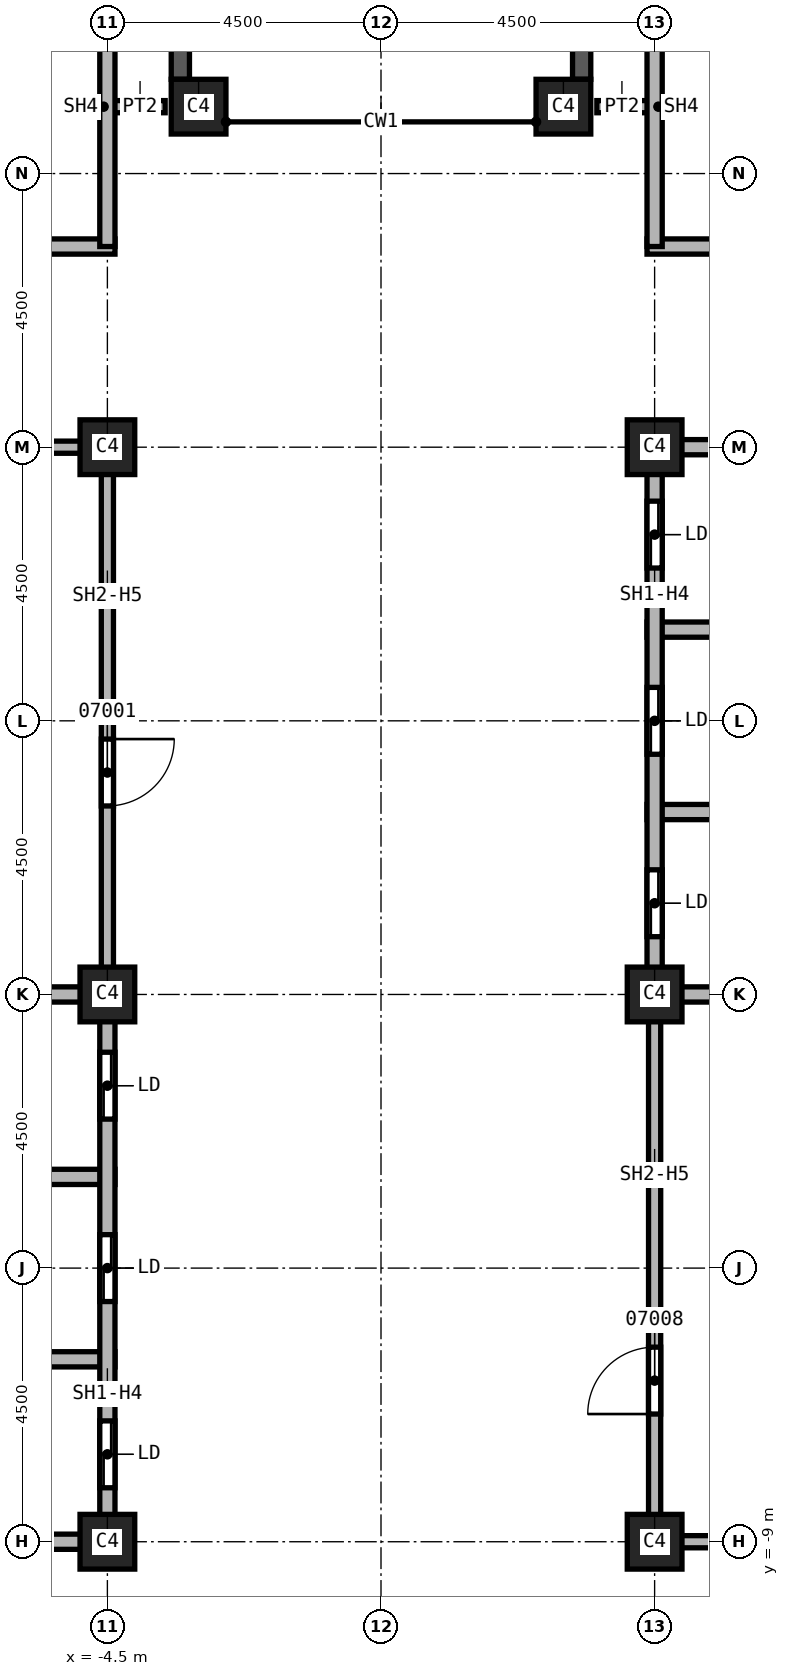
"""IFC4 building model, lengths in metres.
Left out: names, types, materials, properties, quantities, classifications, styles, units other than length and angle.
Written with IfcOpenShell. Run it as: python <this file> out.ifc"""

import sys

from ifc_helpers import new_model, si_unit, direction, frame, frame_2d, origin, origin_2d, place, context, subcontext, project, spatial, rectangle, extrude, element, fill, save


model = new_model("IFC4")
c1 = context("Model", 3, precision=1e-05, world=origin(), true_north=direction((0.0, 1.0)))
c2 = subcontext(c1, "Body", "Model", "MODEL_VIEW")
j1 = project(units=[si_unit("LENGTHUNIT", "METRE"), si_unit("PLANEANGLEUNIT", "RADIAN")], contexts=[c1])
p1 = place(None, origin())
s1 = spatial("IfcSite", under=j1, at=p1, CompositionType="ELEMENT")
p2 = place(p1, origin())
s2 = spatial("IfcBuilding", under=s1, at=p2, CompositionType="ELEMENT")
p3 = place(p2, frame((0.0, 0.0, 138.0)))
s3 = spatial("IfcBuildingStorey", under=s2, at=p3, CompositionType="ELEMENT", Elevation=138.0)
for number, where, z_axis, x_axis in (
    (1, (4.5, 0.0, 0.0), (0.0, 0.0, 1.0), (1.0, 0.0, 0.0)),
    (2, (4.5, 9.0, 0.0), (0.0, 0.0, 1.0), (1.0, 0.0, 0.0)),
    (3, (4.5, -9.0, 0.0), (0.0, 0.0, 1.0), (1.0, 0.0, 0.0)),
    (4, (-4.5, 0.0, 0.0), (0.0, 0.0, 1.0), (1.0, 0.0, 0.0)),
    (5, (-4.5, 9.0, 0.0), (0.0, 0.0, 1.0), (1.0, 0.0, 0.0)),
    (6, (-4.5, -9.0, 0.0), (0.0, 0.0, 1.0), (1.0, 0.0, 0.0)),
    (7, (3.0, 14.6, 0.0), (0.0, 0.0, 1.0), (1.0, 0.0, 0.0)),
    (8, (-3.0, 14.6, 0.0), (0.0, 0.0, 1.0), (1.0, 0.0, 0.0)),
):
    element("IfcColumn", number, at=place(p3, frame(where, z_axis=z_axis, x_axis=x_axis)), inside=s3, PredefinedType="COLUMN", context=c2, shape_type="SweptSolid", body=[
        extrude(rectangle(XDim=0.9, YDim=0.9, at=origin_2d()), origin(), (0.0, 0.0, 1.0), 3.7),
    ])
p4 = place(p3, frame((3.3, 23.05, 0.0), z_axis=(0.0, 0.0, 1.0), x_axis=(0.0, -1.0, 0.0)))
e9 = element("IfcWall", 9, at=p4, inside=s3, PredefinedType="SOLIDWALL", context=c2, shape_type="SweptSolid", body=[
    extrude(rectangle(XDim=8.0, YDim=0.3, at=frame_2d((4.0, 0.0))), origin(), (0.0, 0.0, 1.0), 3.1),
])
p5 = place(p4, frame((0.8, 0.0, 0.8)))
e10 = element("IfcOpeningElement", 10, at=p5, cuts=e9, PredefinedType="OPENING", context=c2, shape_type="SweptSolid", body=[
    extrude(rectangle(XDim=2.4, YDim=1.95, at=frame_2d((1.2, 0.975))), frame((0.0, 0.15, 0.0), z_axis=(0.0, -1.0, 0.0), x_axis=(1.0, 0.0, 0.0)), (0.0, 0.0, 1.0), 0.3),
])
p6 = place(p4, frame((4.8, 0.0, 0.8)))
e11 = element("IfcOpeningElement", 11, at=p6, cuts=e9, PredefinedType="OPENING", context=c2, shape_type="SweptSolid", body=[
    extrude(rectangle(XDim=2.4, YDim=1.95, at=frame_2d((1.2, 0.975))), frame((0.0, 0.15, 0.0), z_axis=(0.0, -1.0, 0.0), x_axis=(1.0, 0.0, 0.0)), (0.0, 0.0, 1.0), 0.3),
])
p7 = place(p3, frame((-3.3, 15.05, 0.0), z_axis=(0.0, 0.0, 1.0), x_axis=(0.0, 1.0, 0.0)))
e12 = element("IfcWall", 12, at=p7, inside=s3, PredefinedType="SOLIDWALL", context=c2, shape_type="SweptSolid", body=[
    extrude(rectangle(XDim=8.0, YDim=0.3, at=frame_2d((4.0, 0.0))), origin(), (0.0, 0.0, 1.0), 3.1),
])
p8 = place(p7, frame((0.8, 0.0, 0.8)))
e13 = element("IfcOpeningElement", 13, at=p8, cuts=e12, PredefinedType="OPENING", context=c2, shape_type="SweptSolid", body=[
    extrude(rectangle(XDim=2.4, YDim=1.95, at=frame_2d((1.2, 0.975))), frame((0.0, 0.15, 0.0), z_axis=(0.0, -1.0, 0.0), x_axis=(1.0, 0.0, 0.0)), (0.0, 0.0, 1.0), 0.3),
])
p9 = place(p7, frame((4.8, 0.0, 0.8)))
e14 = element("IfcOpeningElement", 14, at=p9, cuts=e12, PredefinedType="OPENING", context=c2, shape_type="SweptSolid", body=[
    extrude(rectangle(XDim=2.4, YDim=1.95, at=frame_2d((1.2, 0.975))), frame((0.0, 0.15, 0.0), z_axis=(0.0, -1.0, 0.0), x_axis=(1.0, 0.0, 0.0)), (0.0, 0.0, 1.0), 0.3),
])
for number, where, z_axis, x_axis in (
    (15, (-4.5, 14.6, 0.0), (0.0, 0.0, 1.0), (1.0, 0.0, 0.0)),
    (16, (3.55, 14.6, 0.0), (0.0, 0.0, 1.0), (1.0, 0.0, 0.0)),
):
    element("IfcWall", number, at=place(p3, frame(where, z_axis=z_axis, x_axis=x_axis)), inside=s3, PredefinedType="PARTITIONING", context=c2, shape_type="SweptSolid", body=[
        extrude(rectangle(XDim=0.95, YDim=0.2, at=frame_2d((0.475, 0.0))), origin(), (0.0, 0.0, 1.0), 3.7),
    ])
p10 = place(p3, frame((-7.5, 9.0, 0.0), z_axis=(0.0, 0.0, 1.0), x_axis=(1.0, 0.0, 0.0)))
e17 = element("IfcWall", 17, at=p10, inside=s3, PredefinedType="SOLIDWALL", context=c2, shape_type="SweptSolid", body=[
    extrude(rectangle(XDim=3.0, YDim=0.2, at=frame_2d((1.5, 0.0))), origin(), (0.0, 0.0, 1.0), 2.938),
])
p11 = place(p3, frame((-4.5, 9.1, 0.0), z_axis=(0.0, 0.0, 1.0), x_axis=(0.0, -1.0, 0.0)))
e18 = element("IfcWall", 18, at=p11, inside=s3, PredefinedType="SOLIDWALL", context=c2, shape_type="SweptSolid", body=[
    extrude(rectangle(XDim=9.1, YDim=0.2, at=frame_2d((4.55, 0.0))), origin(), (0.0, 0.0, 1.0), 2.938),
])
p12 = place(p11, frame((4.9, 0.0, 0.0)))
e19 = element("IfcOpeningElement", 19, at=p12, cuts=e18, PredefinedType="OPENING", context=c2, shape_type="SweptSolid", body=[
    extrude(rectangle(XDim=1.1, YDim=2.1, at=frame_2d((0.55, 1.05))), frame((0.0, 0.1, 0.0), z_axis=(0.0, -1.0, 0.0), x_axis=(1.0, 0.0, 0.0)), (0.0, 0.0, 1.0), 0.2),
])
p13 = place(p3, frame((4.5, -9.1, 0.0), z_axis=(0.0, 0.0, 1.0), x_axis=(0.0, 1.0, 0.0)))
e20 = element("IfcWall", 20, at=p13, inside=s3, PredefinedType="SOLIDWALL", context=c2, shape_type="SweptSolid", body=[
    extrude(rectangle(XDim=9.1, YDim=0.2, at=frame_2d((4.55, 0.0))), origin(), (0.0, 0.0, 1.0), 2.938),
])
p14 = place(p13, frame((2.2, 0.0, 0.0)))
e21 = element("IfcOpeningElement", 21, at=p14, cuts=e20, PredefinedType="OPENING", context=c2, shape_type="SweptSolid", body=[
    extrude(rectangle(XDim=1.1, YDim=2.1, at=frame_2d((0.55, 1.05))), frame((0.0, 0.1, 0.0), z_axis=(0.0, -1.0, 0.0), x_axis=(1.0, 0.0, 0.0)), (0.0, 0.0, 1.0), 0.2),
])
p15 = place(p3, frame((7.5, -9.0, 0.0), z_axis=(0.0, 0.0, 1.0), x_axis=(-1.0, 0.0, 0.0)))
e22 = element("IfcWall", 22, at=p15, inside=s3, PredefinedType="SOLIDWALL", context=c2, shape_type="SweptSolid", body=[
    extrude(rectangle(XDim=3.0, YDim=0.2, at=frame_2d((1.5, 0.0))), origin(), (0.0, 0.0, 1.0), 2.938),
])
p16 = place(p3, frame((-13.625, -3.0, 0.0), z_axis=(0.0, 0.0, 1.0), x_axis=(1.0, 0.0, 0.0)))
e23 = element("IfcWall", 23, at=p16, inside=s3, PredefinedType="SOLIDWALL", context=c2, shape_type="SweptSolid", body=[
    extrude(rectangle(XDim=9.25, YDim=0.25, at=frame_2d((4.625, 0.0))), origin(), (0.0, 0.0, 1.0), 3.7),
])
p17 = place(p16, frame((3.25, 0.0, 0.0)))
e24 = element("IfcOpeningElement", 24, at=p17, cuts=e23, PredefinedType="OPENING", context=c2, shape_type="SweptSolid", body=[
    extrude(rectangle(XDim=1.1, YDim=2.1, at=frame_2d((0.55, 1.05))), frame((0.0, 0.125, 0.0), z_axis=(0.0, -1.0, 0.0), x_axis=(1.0, 0.0, 0.0)), (0.0, 0.0, 1.0), 0.25),
])
for number, where, z_axis, x_axis in (
    (25, (-7.625, -6.0, 0.0), (0.0, 0.0, 1.0), (1.0, 0.0, 0.0)),
    (26, (-7.625, 0.0, 0.0), (0.0, 0.0, 1.0), (1.0, 0.0, 0.0)),
):
    element("IfcWall", number, at=place(p3, frame(where, z_axis=z_axis, x_axis=x_axis)), inside=s3, PredefinedType="SOLIDWALL", context=c2, shape_type="SweptSolid", body=[
        extrude(rectangle(XDim=3.25, YDim=0.25, at=frame_2d((1.625, 0.0))), origin(), (0.0, 0.0, 1.0), 3.7),
    ])
p18 = place(p3, frame((-4.5, -9.0, 0.0), z_axis=(0.0, 0.0, 1.0), x_axis=(-1.0, 0.0, 0.0)))
e27 = element("IfcWall", 27, at=p18, inside=s3, PredefinedType="SOLIDWALL", context=c2, shape_type="SweptSolid", body=[
    extrude(rectangle(XDim=3.0, YDim=0.25, at=frame_2d((1.5, 0.0))), origin(), (0.0, 0.0, 1.0), 2.938),
])
p19 = place(p3, frame((-4.5, 0.0, 0.0), z_axis=(0.0, 0.0, 1.0), x_axis=(0.0, -1.0, 0.0)))
e28 = element("IfcWall", 28, at=p19, inside=s3, PredefinedType="SOLIDWALL", context=c2, shape_type="SweptSolid", body=[
    extrude(rectangle(XDim=9.125, YDim=0.25, at=frame_2d((4.562, 0.0))), origin(), (0.0, 0.0, 1.0), 2.938),
])
p20 = place(p19, frame((7.012, 0.0, 0.0)))
e29 = element("IfcOpeningElement", 29, at=p20, cuts=e28, PredefinedType="OPENING", context=c2, shape_type="SweptSolid", body=[
    extrude(rectangle(XDim=1.1, YDim=2.1, at=frame_2d((0.55, 1.05))), frame((0.0, 0.125, 0.0), z_axis=(0.0, -1.0, 0.0), x_axis=(1.0, 0.0, 0.0)), (0.0, 0.0, 1.0), 0.25),
])
p21 = place(p19, frame((3.95, 0.0, 0.0)))
e30 = element("IfcOpeningElement", 30, at=p21, cuts=e28, PredefinedType="OPENING", context=c2, shape_type="SweptSolid", body=[
    extrude(rectangle(XDim=1.1, YDim=2.1, at=frame_2d((0.55, 1.05))), frame((0.0, 0.125, 0.0), z_axis=(0.0, -1.0, 0.0), x_axis=(1.0, 0.0, 0.0)), (0.0, 0.0, 1.0), 0.25),
])
p22 = place(p19, frame((0.95, 0.0, 0.0)))
e31 = element("IfcOpeningElement", 31, at=p22, cuts=e28, PredefinedType="OPENING", context=c2, shape_type="SweptSolid", body=[
    extrude(rectangle(XDim=1.1, YDim=2.1, at=frame_2d((0.55, 1.05))), frame((0.0, 0.125, 0.0), z_axis=(0.0, -1.0, 0.0), x_axis=(1.0, 0.0, 0.0)), (0.0, 0.0, 1.0), 0.25),
])
p23 = place(p3, frame((4.375, 0.0, 0.0), z_axis=(0.0, 0.0, 1.0), x_axis=(1.0, 0.0, 0.0)))
e32 = element("IfcWall", 32, at=p23, inside=s3, PredefinedType="SOLIDWALL", context=c2, shape_type="SweptSolid", body=[
    extrude(rectangle(XDim=3.25, YDim=0.25, at=frame_2d((1.625, 0.0))), origin(), (0.0, 0.0, 1.0), 3.7),
])
p24 = place(p3, frame((4.375, 3.0, 0.0), z_axis=(0.0, 0.0, 1.0), x_axis=(1.0, 0.0, 0.0)))
e33 = element("IfcWall", 33, at=p24, inside=s3, PredefinedType="SOLIDWALL", context=c2, shape_type="SweptSolid", body=[
    extrude(rectangle(XDim=9.25, YDim=0.25, at=frame_2d((4.625, 0.0))), origin(), (0.0, 0.0, 1.0), 3.7),
])
p25 = place(p24, frame((4.125, 0.0, 0.0)))
e34 = element("IfcOpeningElement", 34, at=p25, cuts=e33, PredefinedType="OPENING", context=c2, shape_type="SweptSolid", body=[
    extrude(rectangle(XDim=1.1, YDim=2.1, at=frame_2d((0.55, 1.05))), frame((0.0, 0.125, 0.0), z_axis=(0.0, -1.0, 0.0), x_axis=(1.0, 0.0, 0.0)), (0.0, 0.0, 1.0), 0.25),
])
p26 = place(p3, frame((4.375, 6.0, 0.0), z_axis=(0.0, 0.0, 1.0), x_axis=(1.0, 0.0, 0.0)))
e35 = element("IfcWall", 35, at=p26, inside=s3, PredefinedType="SOLIDWALL", context=c2, shape_type="SweptSolid", body=[
    extrude(rectangle(XDim=3.25, YDim=0.25, at=frame_2d((1.625, 0.0))), origin(), (0.0, 0.0, 1.0), 3.7),
])
p27 = place(p3, frame((4.5, 0.0, 0.0), z_axis=(0.0, 0.0, 1.0), x_axis=(0.0, 1.0, 0.0)))
e36 = element("IfcWall", 36, at=p27, inside=s3, PredefinedType="SOLIDWALL", context=c2, shape_type="SweptSolid", body=[
    extrude(rectangle(XDim=9.125, YDim=0.25, at=frame_2d((4.562, 0.0))), origin(), (0.0, 0.0, 1.0), 2.938),
])
p28 = place(p27, frame((0.95, 0.0, 0.0)))
e37 = element("IfcOpeningElement", 37, at=p28, cuts=e36, PredefinedType="OPENING", context=c2, shape_type="SweptSolid", body=[
    extrude(rectangle(XDim=1.1, YDim=2.1, at=frame_2d((0.55, 1.05))), frame((0.0, 0.125, 0.0), z_axis=(0.0, -1.0, 0.0), x_axis=(1.0, 0.0, 0.0)), (0.0, 0.0, 1.0), 0.25),
])
p29 = place(p27, frame((3.95, 0.0, 0.0)))
e38 = element("IfcOpeningElement", 38, at=p29, cuts=e36, PredefinedType="OPENING", context=c2, shape_type="SweptSolid", body=[
    extrude(rectangle(XDim=1.1, YDim=2.1, at=frame_2d((0.55, 1.05))), frame((0.0, 0.125, 0.0), z_axis=(0.0, -1.0, 0.0), x_axis=(1.0, 0.0, 0.0)), (0.0, 0.0, 1.0), 0.25),
])
p30 = place(p27, frame((7.012, 0.0, 0.0)))
e39 = element("IfcOpeningElement", 39, at=p30, cuts=e36, PredefinedType="OPENING", context=c2, shape_type="SweptSolid", body=[
    extrude(rectangle(XDim=1.1, YDim=2.1, at=frame_2d((0.55, 1.05))), frame((0.0, 0.125, 0.0), z_axis=(0.0, -1.0, 0.0), x_axis=(1.0, 0.0, 0.0)), (0.0, 0.0, 1.0), 0.25),
])
p31 = place(p3, frame((4.5, 9.0, 0.0), z_axis=(0.0, 0.0, 1.0), x_axis=(1.0, 0.0, 0.0)))
e40 = element("IfcWall", 40, at=p31, inside=s3, PredefinedType="SOLIDWALL", context=c2, shape_type="SweptSolid", body=[
    extrude(rectangle(XDim=3.0, YDim=0.25, at=frame_2d((1.5, 0.0))), origin(), (0.0, 0.0, 1.0), 2.938),
])
p32 = place(p3, frame((-13.5, 12.3, 0.0), z_axis=(0.0, 0.0, 1.0), x_axis=(1.0, 0.0, 0.0)))
e41 = element("IfcWall", 41, at=p32, inside=s3, PredefinedType="SOLIDWALL", context=c2, shape_type="SweptSolid", body=[
    extrude(rectangle(XDim=9.125, YDim=0.25, at=frame_2d((4.562, 0.0))), origin(), (0.0, 0.0, 1.0), 3.7),
])
p33 = place(p32, frame((0.6, 0.0, 0.0)))
e42 = element("IfcOpeningElement", 42, at=p33, cuts=e41, PredefinedType="OPENING", context=c2, shape_type="SweptSolid", body=[
    extrude(rectangle(XDim=1.2, YDim=2.1, at=frame_2d((0.6, 1.05))), frame((0.0, 0.125, 0.0), z_axis=(0.0, -1.0, 0.0), x_axis=(1.0, 0.0, 0.0)), (0.0, 0.0, 1.0), 0.25),
])
p34 = place(p3, frame((-4.5, 16.8, 0.0), z_axis=(0.0, 0.0, 1.0), x_axis=(0.0, -1.0, 0.0)))
e43 = element("IfcWall", 43, at=p34, inside=s3, PredefinedType="SOLIDWALL", context=c2, shape_type="SweptSolid", body=[
    extrude(rectangle(XDim=4.5, YDim=0.25, at=frame_2d((2.25, 0.0))), origin(), (0.0, 0.0, 1.0), 3.7),
])
p35 = place(p3, frame((4.375, 12.3, 0.0), z_axis=(0.0, 0.0, 1.0), x_axis=(1.0, 0.0, 0.0)))
e44 = element("IfcWall", 44, at=p35, inside=s3, PredefinedType="SOLIDWALL", context=c2, shape_type="SweptSolid", body=[
    extrude(rectangle(XDim=9.125, YDim=0.25, at=frame_2d((4.562, 0.0))), origin(), (0.0, 0.0, 1.0), 3.7),
])
p36 = place(p35, frame((7.2, 0.0, 0.0)))
e45 = element("IfcOpeningElement", 45, at=p36, cuts=e44, PredefinedType="OPENING", context=c2, shape_type="SweptSolid", body=[
    extrude(rectangle(XDim=1.2, YDim=2.1, at=frame_2d((0.6, 1.05))), frame((0.0, 0.125, 0.0), z_axis=(0.0, -1.0, 0.0), x_axis=(1.0, 0.0, 0.0)), (0.0, 0.0, 1.0), 0.25),
])
p37 = place(p3, frame((4.5, 12.3, 0.0), z_axis=(0.0, 0.0, 1.0), x_axis=(0.0, 1.0, 0.0)))
e46 = element("IfcWall", 46, at=p37, inside=s3, PredefinedType="SOLIDWALL", context=c2, shape_type="SweptSolid", body=[
    extrude(rectangle(XDim=4.5, YDim=0.25, at=frame_2d((2.25, 0.0))), origin(), (0.0, 0.0, 1.0), 3.7),
])
p38 = place(p12, origin())
e47 = element("IfcDoor", 47, at=p38, inside=s3, OperationType="SINGLE_SWING_RIGHT", PredefinedType="DOOR", context=c2, shape_type="SweptSolid", body=[
    extrude(rectangle(XDim=1.1, YDim=2.1, at=frame_2d((0.55, 1.05))), frame((0.0, 0.025, 0.0), z_axis=(0.0, -1.0, 0.0), x_axis=(1.0, 0.0, 0.0)), (0.0, 0.0, 1.0), 0.05),
])
fill(e19, e47)
p39 = place(p14, origin())
e48 = element("IfcDoor", 48, at=p39, inside=s3, OperationType="SINGLE_SWING_LEFT", PredefinedType="DOOR", context=c2, shape_type="SweptSolid", body=[
    extrude(rectangle(XDim=1.1, YDim=2.1, at=frame_2d((0.55, 1.05))), frame((0.0, 0.025, 0.0), z_axis=(0.0, -1.0, 0.0), x_axis=(1.0, 0.0, 0.0)), (0.0, 0.0, 1.0), 0.05),
])
fill(e21, e48)
p40 = place(p20, origin())
e49 = element("IfcDoor", 49, at=p40, inside=s3, OperationType="SLIDING_TO_LEFT", PredefinedType="DOOR", context=c2, shape_type="SweptSolid", body=[
    extrude(rectangle(XDim=1.1, YDim=2.1, at=frame_2d((0.55, 1.05))), frame((0.0, 0.025, 0.0), z_axis=(0.0, -1.0, 0.0), x_axis=(1.0, 0.0, 0.0)), (0.0, 0.0, 1.0), 0.05),
])
fill(e29, e49)
p41 = place(p21, origin())
e50 = element("IfcDoor", 50, at=p41, inside=s3, OperationType="SLIDING_TO_LEFT", PredefinedType="DOOR", context=c2, shape_type="SweptSolid", body=[
    extrude(rectangle(XDim=1.1, YDim=2.1, at=frame_2d((0.55, 1.05))), frame((0.0, 0.025, 0.0), z_axis=(0.0, -1.0, 0.0), x_axis=(1.0, 0.0, 0.0)), (0.0, 0.0, 1.0), 0.05),
])
fill(e30, e50)
p42 = place(p22, origin())
e51 = element("IfcDoor", 51, at=p42, inside=s3, OperationType="SLIDING_TO_LEFT", PredefinedType="DOOR", context=c2, shape_type="SweptSolid", body=[
    extrude(rectangle(XDim=1.1, YDim=2.1, at=frame_2d((0.55, 1.05))), frame((0.0, 0.025, 0.0), z_axis=(0.0, -1.0, 0.0), x_axis=(1.0, 0.0, 0.0)), (0.0, 0.0, 1.0), 0.05),
])
fill(e31, e51)
p43 = place(p28, origin())
e52 = element("IfcDoor", 52, at=p43, inside=s3, OperationType="SLIDING_TO_LEFT", PredefinedType="DOOR", context=c2, shape_type="SweptSolid", body=[
    extrude(rectangle(XDim=1.1, YDim=2.1, at=frame_2d((0.55, 1.05))), frame((0.0, 0.025, 0.0), z_axis=(0.0, -1.0, 0.0), x_axis=(1.0, 0.0, 0.0)), (0.0, 0.0, 1.0), 0.05),
])
fill(e37, e52)
p44 = place(p29, origin())
e53 = element("IfcDoor", 53, at=p44, inside=s3, OperationType="SLIDING_TO_LEFT", PredefinedType="DOOR", context=c2, shape_type="SweptSolid", body=[
    extrude(rectangle(XDim=1.1, YDim=2.1, at=frame_2d((0.55, 1.05))), frame((0.0, 0.025, 0.0), z_axis=(0.0, -1.0, 0.0), x_axis=(1.0, 0.0, 0.0)), (0.0, 0.0, 1.0), 0.05),
])
fill(e38, e53)
p45 = place(p30, origin())
e54 = element("IfcDoor", 54, at=p45, inside=s3, OperationType="SLIDING_TO_LEFT", PredefinedType="DOOR", context=c2, shape_type="SweptSolid", body=[
    extrude(rectangle(XDim=1.1, YDim=2.1, at=frame_2d((0.55, 1.05))), frame((0.0, 0.025, 0.0), z_axis=(0.0, -1.0, 0.0), x_axis=(1.0, 0.0, 0.0)), (0.0, 0.0, 1.0), 0.05),
])
fill(e39, e54)
save(model, sys.argv[1])
